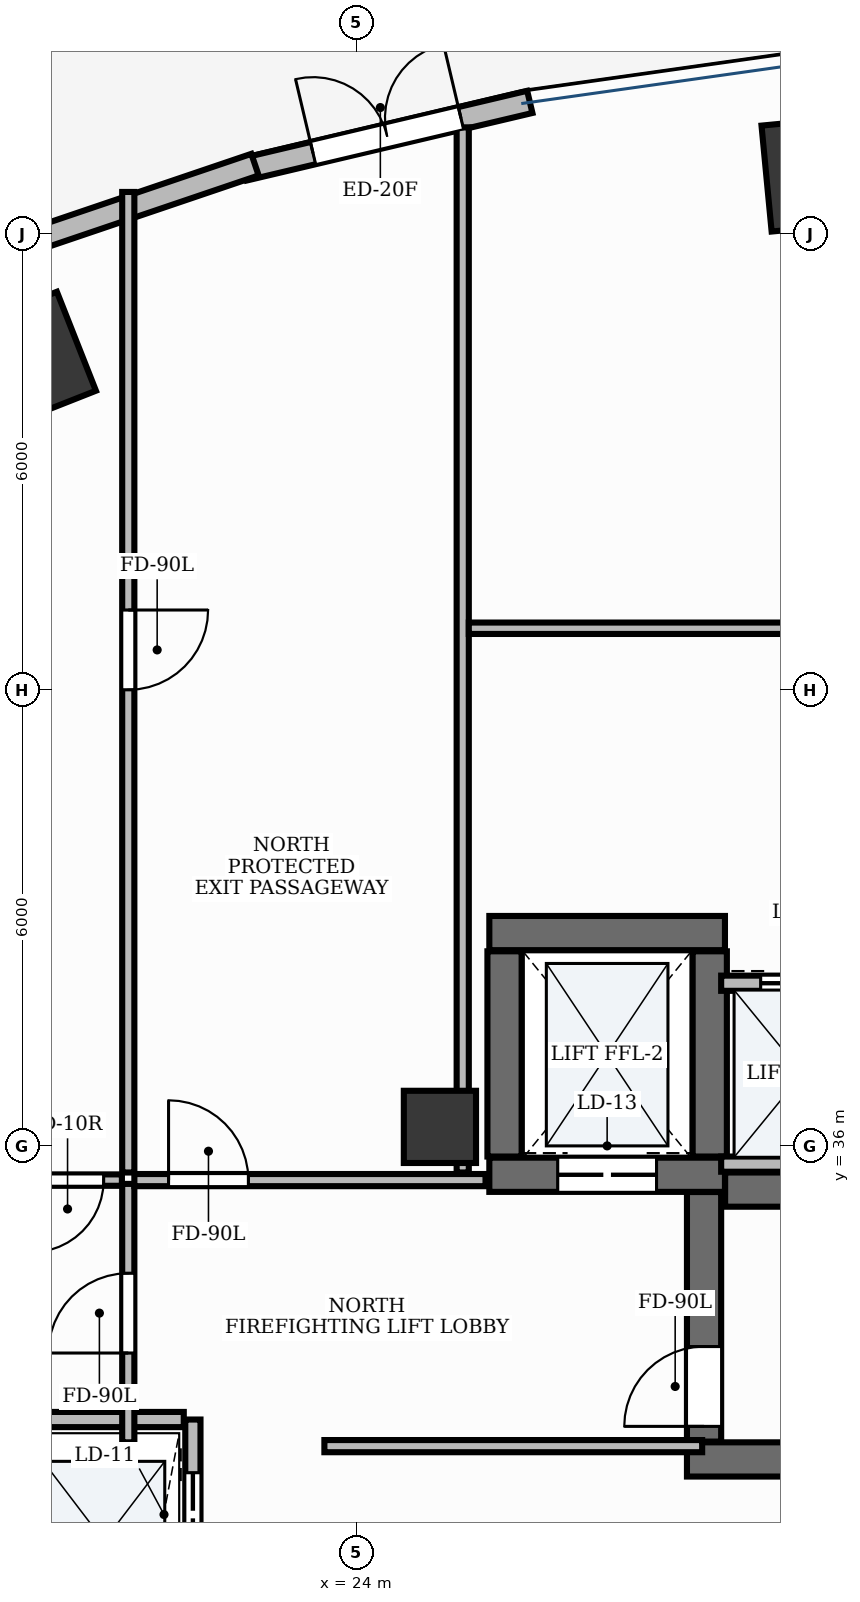
"""IFC4 building model, lengths in metres.
Left out: names, types, materials, properties, quantities, classifications, styles, units other than length and angle.
Written with IfcOpenShell. Run it as: python <this file> out.ifc"""

import sys

from ifc_helpers import new_model, si_unit, direction, frame, frame_2d, origin, origin_2d, place, context, subcontext, project, spatial, rectangle, extrude, element, fill, save


model = new_model("IFC4")
c1 = context("Model", 3, precision=1e-05, world=origin(), true_north=direction((0.0, 1.0)))
c2 = subcontext(c1, "Body", "Model", "MODEL_VIEW")
j1 = project(units=[si_unit("LENGTHUNIT", "METRE"), si_unit("PLANEANGLEUNIT", "RADIAN")], contexts=[c1])
p1 = place(None, origin())
s1 = spatial("IfcSite", under=j1, at=p1, CompositionType="ELEMENT")
p2 = place(p1, origin())
s2 = spatial("IfcBuilding", under=s1, at=p2, CompositionType="ELEMENT")
p3 = place(p2, origin())
s3 = spatial("IfcBuildingStorey", under=s2, at=p3, CompositionType="ELEMENT", Elevation=0.0)
p4 = place(p3, frame((28.852, 35.425, 0.0), z_axis=(0.0, 0.0, 1.0), x_axis=(1.0, 0.0, 0.0)))
e1 = element("IfcWall", 1, at=p4, inside=s3, PredefinedType="SHEAR", context=c2, shape_type="SweptSolid", body=[
    extrude(rectangle(XDim=8.248, YDim=0.45, at=frame_2d((4.124, 0.0))), origin(), (0.0, 0.0, 1.0), 5.1),
])
p5 = place(p3, frame((28.35, 31.875, 0.0), z_axis=(0.0, 0.0, 1.0), x_axis=(1.0, 0.0, 0.0)))
e2 = element("IfcWall", 2, at=p5, inside=s3, PredefinedType="SHEAR", context=c2, shape_type="SweptSolid", body=[
    extrude(rectangle(XDim=8.75, YDim=0.45, at=frame_2d((4.375, 0.0))), origin(), (0.0, 0.0, 1.0), 5.1),
])
p6 = place(p3, frame((28.575, 32.11, 0.0), z_axis=(0.0, 0.0, 1.0), x_axis=(0.0, 1.0, 0.0)))
e3 = element("IfcWall", 3, at=p6, inside=s3, PredefinedType="SHEAR", context=c2, shape_type="SweptSolid", body=[
    extrude(rectangle(XDim=3.283, YDim=0.45, at=frame_2d((1.642, 0.0))), origin(), (0.0, 0.0, 1.0), 5.1),
])
p7 = place(p6, frame((0.2, 0.0, 0.0)))
e4 = element("IfcOpeningElement", 4, at=p7, cuts=e3, PredefinedType="OPENING", context=c2, shape_type="SweptSolid", body=[
    extrude(rectangle(XDim=1.05, YDim=2.15, at=frame_2d((0.525, 1.075))), frame((0.0, 0.24, 0.0), z_axis=(0.0, -1.0, 0.0), x_axis=(1.0, 0.0, 0.0)), (0.0, 0.0, 1.0), 0.48),
])
p8 = place(p3, frame((25.75, 38.8, 0.0), z_axis=(0.0, 0.0, 1.0), x_axis=(1.0, 0.0, 0.0)))
e5 = element("IfcWall", 5, at=p8, inside=s3, PredefinedType="SHEAR", context=c2, shape_type="SweptSolid", body=[
    extrude(rectangle(XDim=3.1, YDim=0.45, at=frame_2d((1.55, 0.0))), origin(), (0.0, 0.0, 1.0), 5.1),
])
p9 = place(p3, frame((25.75, 35.62, 0.0), z_axis=(0.0, 0.0, 1.0), x_axis=(1.0, 0.0, 0.0)))
e6 = element("IfcWall", 6, at=p9, inside=s3, PredefinedType="SHEAR", context=c2, shape_type="SweptSolid", body=[
    extrude(rectangle(XDim=3.1, YDim=0.45, at=frame_2d((1.55, 0.0))), origin(), (0.0, 0.0, 1.0), 5.1),
])
p10 = place(p9, frame((0.9, 0.0, 0.0)))
e7 = element("IfcOpeningElement", 7, at=p10, cuts=e6, PredefinedType="OPENING", context=c2, shape_type="SweptSolid", body=[
    extrude(rectangle(XDim=1.3, YDim=2.2, at=frame_2d((0.65, 1.1))), frame((0.0, 0.24, 0.0), z_axis=(0.0, -1.0, 0.0), x_axis=(1.0, 0.0, 0.0)), (0.0, 0.0, 1.0), 0.48),
])
for number, where, z_axis, x_axis in (
    (8, (25.95, 35.86, 0.0), (0.0, 0.0, 1.0), (0.0, 1.0, 0.0)),
    (9, (28.65, 35.86, 0.0), (0.0, 0.0, 1.0), (0.0, 1.0, 0.0)),
):
    element("IfcWall", number, at=place(p3, frame(where, z_axis=z_axis, x_axis=x_axis)), inside=s3, PredefinedType="SHEAR", context=c2, shape_type="SweptSolid", body=[
        extrude(rectangle(XDim=2.7, YDim=0.45, at=frame_2d((1.35, 0.0))), origin(), (0.0, 0.0, 1.0), 5.1),
    ])
p11 = place(p3, frame((25.1, 36.25, -0.0), z_axis=(0.0, 0.0, 1.0), x_axis=(1.0, 0.0, 0.0)))
e10 = element("IfcColumn", 10, at=p11, inside=s3, PredefinedType="PILASTER", context=c2, shape_type="SweptSolid", body=[
    extrude(rectangle(XDim=0.95, YDim=0.95, at=origin_2d()), origin(), (0.0, 0.0, 1.0), 5.101),
])
for number, where, z_axis, x_axis in (
    (11, (30.094, 48.792, -0.0), (0.0, 0.0, 1.0), (0.995, 0.095, 0.0)),
    (12, (19.667, 46.329, -0.0), (0.0, 0.0, 1.0), (0.93, 0.367, 0.0)),
):
    element("IfcColumn", number, at=place(p3, frame(where, z_axis=z_axis, x_axis=x_axis)), inside=s3, PredefinedType="COLUMN", context=c2, shape_type="SweptSolid", body=[
        extrude(rectangle(XDim=1.4, YDim=1.4, at=origin_2d()), origin(), (0.0, 0.0, 1.0), 5.101),
    ])
p12 = place(p3, frame((22.525, 48.847, 0.0), z_axis=(0.0, 0.0, 1.0), x_axis=(0.973186156802, 0.230018921417, 0.0)))
e13 = element("IfcWall", 13, at=p12, inside=s3, PredefinedType="STANDARD", context=c2, shape_type="SweptSolid", body=[
    extrude(rectangle(XDim=3.861, YDim=0.3, at=frame_2d((1.931, 0.0))), origin(), (0.0, 0.0, 1.0), 5.1),
])
p13 = place(p12, frame((0.931, 0.0, 0.0)))
e14 = element("IfcOpeningElement", 14, at=p13, cuts=e13, PredefinedType="OPENING", context=c2, shape_type="SweptSolid", body=[
    extrude(rectangle(XDim=2.0, YDim=2.3, at=frame_2d((1.0, 1.15))), frame((0.0, 0.165, 0.0), z_axis=(0.0, -1.0, 0.0), x_axis=(1.0, 0.0, 0.0)), (0.0, 0.0, 1.0), 0.33),
])
p14 = place(p3, frame((22.667, 48.909, 0.0), z_axis=(0.0, 0.0, 1.0), x_axis=(-0.94702579403, -0.321157508773, 0.0)))
e15 = element("IfcWall", 15, at=p14, inside=s3, PredefinedType="STANDARD", context=c2, shape_type="SweptSolid", body=[
    extrude(rectangle(XDim=3.83, YDim=0.3, at=frame_2d((1.915, 0.0))), origin(), (0.0, 0.0, 1.0), 5.1),
])
p15 = place(p3, frame((21.85, 21.6, 0.0), z_axis=(0.0, 0.0, 1.0), x_axis=(0.0, 1.0, 0.0)))
e16 = element("IfcWall", 16, at=p15, inside=s3, PredefinedType="PARTITIONING", context=c2, shape_type="SweptSolid", body=[
    extrude(rectangle(XDim=10.8, YDim=0.2, at=frame_2d((5.4, 0.0))), origin(), (0.0, 0.0, 1.0), 4.11),
])
p16 = place(p15, frame((0.9, 0.0, 0.0)))
e17 = element("IfcOpeningElement", 17, at=p16, cuts=e16, PredefinedType="OPENING", context=c2, shape_type="SweptSolid", body=[
    extrude(rectangle(XDim=1.1, YDim=2.2, at=frame_2d((0.55, 1.1))), frame((0.0, 0.115, 0.0), z_axis=(0.0, -1.0, 0.0), x_axis=(1.0, 0.0, 0.0)), (0.0, 0.0, 1.0), 0.23),
])
p17 = place(p15, frame((3.6, 0.0, 0.0)))
e18 = element("IfcOpeningElement", 18, at=p17, cuts=e16, PredefinedType="OPENING", context=c2, shape_type="SweptSolid", body=[
    extrude(rectangle(XDim=1.1, YDim=2.2, at=frame_2d((0.55, 1.1))), frame((0.0, 0.115, 0.0), z_axis=(0.0, -1.0, 0.0), x_axis=(1.0, 0.0, 0.0)), (0.0, 0.0, 1.0), 0.23),
])
p18 = place(p15, frame((6.3, 0.0, 0.0)))
e19 = element("IfcOpeningElement", 19, at=p18, cuts=e16, PredefinedType="OPENING", context=c2, shape_type="SweptSolid", body=[
    extrude(rectangle(XDim=1.1, YDim=2.2, at=frame_2d((0.55, 1.1))), frame((0.0, 0.115, 0.0), z_axis=(0.0, -1.0, 0.0), x_axis=(1.0, 0.0, 0.0)), (0.0, 0.0, 1.0), 0.23),
])
p19 = place(p15, frame((9.0, 0.0, 0.0)))
e20 = element("IfcOpeningElement", 20, at=p19, cuts=e16, PredefinedType="OPENING", context=c2, shape_type="SweptSolid", body=[
    extrude(rectangle(XDim=1.1, YDim=2.2, at=frame_2d((0.55, 1.1))), frame((0.0, 0.115, 0.0), z_axis=(0.0, -1.0, 0.0), x_axis=(1.0, 0.0, 0.0)), (0.0, 0.0, 1.0), 0.23),
])
p20 = place(p3, frame((19.62, 32.4, 0.0), z_axis=(0.0, 0.0, 1.0), x_axis=(1.0, 0.0, 0.0)))
e21 = element("IfcWall", 21, at=p20, inside=s3, PredefinedType="PARTITIONING", context=c2, shape_type="SweptSolid", body=[
    extrude(rectangle(XDim=2.11, YDim=0.2, at=frame_2d((1.055, 0.0))), origin(), (0.0, 0.0, 1.0), 4.11),
])
p21 = place(p3, frame((28.8, 35.76, 0.0), z_axis=(0.0, 0.0, 1.0), x_axis=(1.0, 0.0, 0.0)))
e22 = element("IfcWall", 22, at=p21, inside=s3, PredefinedType="PARTITIONING", context=c2, shape_type="SweptSolid", body=[
    extrude(rectangle(XDim=4.57, YDim=0.2, at=frame_2d((2.285, 0.0))), origin(), (0.0, 0.0, 1.0), 4.11),
])
p22 = place(p3, frame((28.8, 38.14, 0.0), z_axis=(0.0, 0.0, 1.0), x_axis=(1.0, 0.0, 0.0)))
e23 = element("IfcWall", 23, at=p22, inside=s3, PredefinedType="PARTITIONING", context=c2, shape_type="SweptSolid", body=[
    extrude(rectangle(XDim=4.57, YDim=0.2, at=frame_2d((2.285, 0.0))), origin(), (0.0, 0.0, 1.0), 4.11),
])
p23 = place(p22, frame((0.52, 0.0, 0.0)))
e24 = element("IfcOpeningElement", 24, at=p23, cuts=e23, PredefinedType="OPENING", context=c2, shape_type="SweptSolid", body=[
    extrude(rectangle(XDim=1.1, YDim=2.2, at=frame_2d((0.55, 1.1))), frame((0.0, 0.115, 0.0), z_axis=(0.0, -1.0, 0.0), x_axis=(1.0, 0.0, 0.0)), (0.0, 0.0, 1.0), 0.23),
])
p24 = place(p22, frame((2.92, 0.0, 0.0)))
e25 = element("IfcOpeningElement", 25, at=p24, cuts=e23, PredefinedType="OPENING", context=c2, shape_type="SweptSolid", body=[
    extrude(rectangle(XDim=1.1, YDim=2.2, at=frame_2d((0.55, 1.1))), frame((0.0, 0.115, 0.0), z_axis=(0.0, -1.0, 0.0), x_axis=(1.0, 0.0, 0.0)), (0.0, 0.0, 1.0), 0.23),
])
p25 = place(p3, frame((21.0, 32.1, 0.0), z_axis=(0.0, 0.0, 1.0), x_axis=(0.0, 1.0, 0.0)))
e26 = element("IfcWall", 26, at=p25, inside=s3, PredefinedType="PARTITIONING", context=c2, shape_type="SweptSolid", body=[
    extrude(rectangle(XDim=3.4, YDim=0.16, at=frame_2d((1.7, 0.0))), origin(), (0.0, 0.0, 1.0), 4.11),
])
p26 = place(p25, frame((1.175, 0.0, 0.0)))
e27 = element("IfcOpeningElement", 27, at=p26, cuts=e26, PredefinedType="OPENING", context=c2, shape_type="SweptSolid", body=[
    extrude(rectangle(XDim=1.05, YDim=2.15, at=frame_2d((0.525, 1.075))), frame((0.0, 0.095, 0.0), z_axis=(0.0, -1.0, 0.0), x_axis=(1.0, 0.0, 0.0)), (0.0, 0.0, 1.0), 0.19),
])
p27 = place(p3, frame((23.58, 32.05, 0.0), z_axis=(0.0, 0.0, 1.0), x_axis=(1.0, 0.0, 0.0)))
e28 = element("IfcWall", 28, at=p27, inside=s3, PredefinedType="PARTITIONING", context=c2, shape_type="SweptSolid", body=[
    extrude(rectangle(XDim=4.97, YDim=0.16, at=frame_2d((2.485, 0.0))), origin(), (0.0, 0.0, 1.0), 4.11),
])
p28 = place(p3, frame((21.08, 35.55, 0.0), z_axis=(0.0, 0.0, 1.0), x_axis=(1.0, 0.0, 0.0)))
e29 = element("IfcWall", 29, at=p28, inside=s3, PredefinedType="PARTITIONING", context=c2, shape_type="SweptSolid", body=[
    extrude(rectangle(XDim=4.62, YDim=0.16, at=frame_2d((2.31, 0.0))), origin(), (0.0, 0.0, 1.0), 4.11),
])
p29 = place(p28, frame((0.45, 0.0, 0.0)))
e30 = element("IfcOpeningElement", 30, at=p29, cuts=e29, PredefinedType="OPENING", context=c2, shape_type="SweptSolid", body=[
    extrude(rectangle(XDim=1.05, YDim=2.15, at=frame_2d((0.525, 1.075))), frame((0.0, 0.095, 0.0), z_axis=(0.0, -1.0, 0.0), x_axis=(1.0, 0.0, 0.0)), (0.0, 0.0, 1.0), 0.19),
])
p30 = place(p3, frame((21.0, 48.55, 0.0), z_axis=(0.0, 0.0, 1.0), x_axis=(0.0, -1.0, 0.0)))
e31 = element("IfcWall", 31, at=p30, inside=s3, PredefinedType="PARTITIONING", context=c2, shape_type="SweptSolid", body=[
    extrude(rectangle(XDim=12.9, YDim=0.16, at=frame_2d((6.45, 0.0))), origin(), (0.0, 0.0, 1.0), 4.11),
])
p31 = place(p30, frame((5.5, 0.0, 0.0)))
e32 = element("IfcOpeningElement", 32, at=p31, cuts=e31, PredefinedType="OPENING", context=c2, shape_type="SweptSolid", body=[
    extrude(rectangle(XDim=1.05, YDim=2.15, at=frame_2d((0.525, 1.075))), frame((0.0, 0.095, 0.0), z_axis=(0.0, -1.0, 0.0), x_axis=(1.0, 0.0, 0.0)), (0.0, 0.0, 1.0), 0.19),
])
p32 = place(p3, frame((25.4, 35.65, 0.0), z_axis=(0.0, 0.0, 1.0), x_axis=(0.0, 1.0, 0.0)))
e33 = element("IfcWall", 33, at=p32, inside=s3, PredefinedType="PARTITIONING", context=c2, shape_type="SweptSolid", body=[
    extrude(rectangle(XDim=13.75, YDim=0.16, at=frame_2d((6.875, 0.0))), origin(), (0.0, 0.0, 1.0), 4.11),
])
p33 = place(p3, frame((36.542, 42.81, 0.0), z_axis=(0.0, 0.0, 1.0), x_axis=(-1.0, 0.0, 0.0)))
e34 = element("IfcWall", 34, at=p33, inside=s3, PredefinedType="PARTITIONING", context=c2, shape_type="SweptSolid", body=[
    extrude(rectangle(XDim=11.062, YDim=0.15, at=frame_2d((5.531, 0.0))), origin(), (0.0, 0.0, 1.0), 4.11),
])
p34 = place(p33, frame((0.931, 0.0, 0.0)))
e35 = element("IfcOpeningElement", 35, at=p34, cuts=e34, PredefinedType="OPENING", context=c2, shape_type="SweptSolid", body=[
    extrude(rectangle(XDim=0.95, YDim=2.15, at=frame_2d((0.475, 1.075))), frame((0.0, 0.09, 0.0), z_axis=(0.0, -1.0, 0.0), x_axis=(1.0, 0.0, 0.0)), (0.0, 0.0, 1.0), 0.18),
])
p35 = place(p3, frame((20.916, 35.55, 0.0), z_axis=(0.0, 0.0, 1.0), x_axis=(-1.0, 0.0, 0.0)))
e36 = element("IfcWall", 36, at=p35, inside=s3, PredefinedType="PARTITIONING", context=c2, shape_type="SweptSolid", body=[
    extrude(rectangle(XDim=1.964, YDim=0.15, at=frame_2d((0.982, 0.0))), origin(), (0.0, 0.0, 1.0), 4.11),
])
p36 = place(p35, frame((0.24, 0.0, 0.0)))
e37 = element("IfcOpeningElement", 37, at=p36, cuts=e36, PredefinedType="OPENING", context=c2, shape_type="SweptSolid", body=[
    extrude(rectangle(XDim=0.95, YDim=2.15, at=frame_2d((0.475, 1.075))), frame((0.0, 0.09, 0.0), z_axis=(0.0, -1.0, 0.0), x_axis=(1.0, 0.0, 0.0)), (0.0, 0.0, 1.0), 0.18),
])
p37 = place(p13, origin())
e38 = element("IfcDoor", 38, at=p37, inside=s3, OperationType="DOUBLE_DOOR_SINGLE_SWING", PredefinedType="DOOR", context=c2, shape_type="SweptSolid", body=[
    extrude(rectangle(XDim=2.0, YDim=2.3, at=frame_2d((1.0, 1.15))), frame((0.0, 0.025, 0.0), z_axis=(0.0, -1.0, 0.0), x_axis=(1.0, 0.0, 0.0)), (0.0, 0.0, 1.0), 0.05),
])
fill(e14, e38)
p38 = place(p7, origin())
e39 = element("IfcDoor", 39, at=p38, inside=s3, OperationType="SINGLE_SWING_LEFT", PredefinedType="DOOR", context=c2, shape_type="SweptSolid", body=[
    extrude(rectangle(XDim=1.05, YDim=2.15, at=frame_2d((0.525, 1.075))), frame((0.0, 0.025, 0.0), z_axis=(0.0, -1.0, 0.0), x_axis=(1.0, 0.0, 0.0)), (0.0, 0.0, 1.0), 0.05),
])
fill(e4, e39)
p39 = place(p19, origin())
e40 = element("IfcDoor", 40, at=p39, inside=s3, OperationType="DOUBLE_DOOR_SLIDING", PredefinedType="DOOR", context=c2, shape_type="SweptSolid", body=[
    extrude(rectangle(XDim=1.1, YDim=2.2, at=frame_2d((0.55, 1.1))), frame((0.0, 0.025, 0.0), z_axis=(0.0, -1.0, 0.0), x_axis=(1.0, 0.0, 0.0)), (0.0, 0.0, 1.0), 0.05),
])
fill(e20, e40)
p40 = place(p23, origin())
e41 = element("IfcDoor", 41, at=p40, inside=s3, OperationType="DOUBLE_DOOR_SLIDING", PredefinedType="DOOR", context=c2, shape_type="SweptSolid", body=[
    extrude(rectangle(XDim=1.1, YDim=2.2, at=frame_2d((0.55, 1.1))), frame((0.0, 0.025, 0.0), z_axis=(0.0, -1.0, 0.0), x_axis=(1.0, 0.0, 0.0)), (0.0, 0.0, 1.0), 0.05),
])
fill(e24, e41)
p41 = place(p10, origin())
e42 = element("IfcDoor", 42, at=p41, inside=s3, OperationType="DOUBLE_DOOR_SLIDING", PredefinedType="DOOR", context=c2, shape_type="SweptSolid", body=[
    extrude(rectangle(XDim=1.3, YDim=2.2, at=frame_2d((0.65, 1.1))), frame((0.0, 0.025, 0.0), z_axis=(0.0, -1.0, 0.0), x_axis=(1.0, 0.0, 0.0)), (0.0, 0.0, 1.0), 0.05),
])
fill(e7, e42)
p42 = place(p26, origin())
e43 = element("IfcDoor", 43, at=p42, inside=s3, OperationType="SINGLE_SWING_LEFT", PredefinedType="DOOR", context=c2, shape_type="SweptSolid", body=[
    extrude(rectangle(XDim=1.05, YDim=2.15, at=frame_2d((0.525, 1.075))), frame((0.0, 0.025, 0.0), z_axis=(0.0, -1.0, 0.0), x_axis=(1.0, 0.0, 0.0)), (0.0, 0.0, 1.0), 0.05),
])
fill(e27, e43)
p43 = place(p29, origin())
e44 = element("IfcDoor", 44, at=p43, inside=s3, OperationType="SINGLE_SWING_LEFT", PredefinedType="DOOR", context=c2, shape_type="SweptSolid", body=[
    extrude(rectangle(XDim=1.05, YDim=2.15, at=frame_2d((0.525, 1.075))), frame((0.0, 0.025, 0.0), z_axis=(0.0, -1.0, 0.0), x_axis=(1.0, 0.0, 0.0)), (0.0, 0.0, 1.0), 0.05),
])
fill(e30, e44)
p44 = place(p31, origin())
e45 = element("IfcDoor", 45, at=p44, inside=s3, OperationType="SINGLE_SWING_LEFT", PredefinedType="DOOR", context=c2, shape_type="SweptSolid", body=[
    extrude(rectangle(XDim=1.05, YDim=2.15, at=frame_2d((0.525, 1.075))), frame((0.0, 0.025, 0.0), z_axis=(0.0, -1.0, 0.0), x_axis=(1.0, 0.0, 0.0)), (0.0, 0.0, 1.0), 0.05),
])
fill(e32, e45)
p45 = place(p36, origin())
e46 = element("IfcDoor", 46, at=p45, inside=s3, OperationType="SINGLE_SWING_RIGHT", PredefinedType="DOOR", context=c2, shape_type="SweptSolid", body=[
    extrude(rectangle(XDim=0.95, YDim=2.15, at=frame_2d((0.475, 1.075))), frame((0.0, 0.025, 0.0), z_axis=(0.0, -1.0, 0.0), x_axis=(1.0, 0.0, 0.0)), (0.0, 0.0, 1.0), 0.05),
])
fill(e37, e46)
save(model, sys.argv[1])
